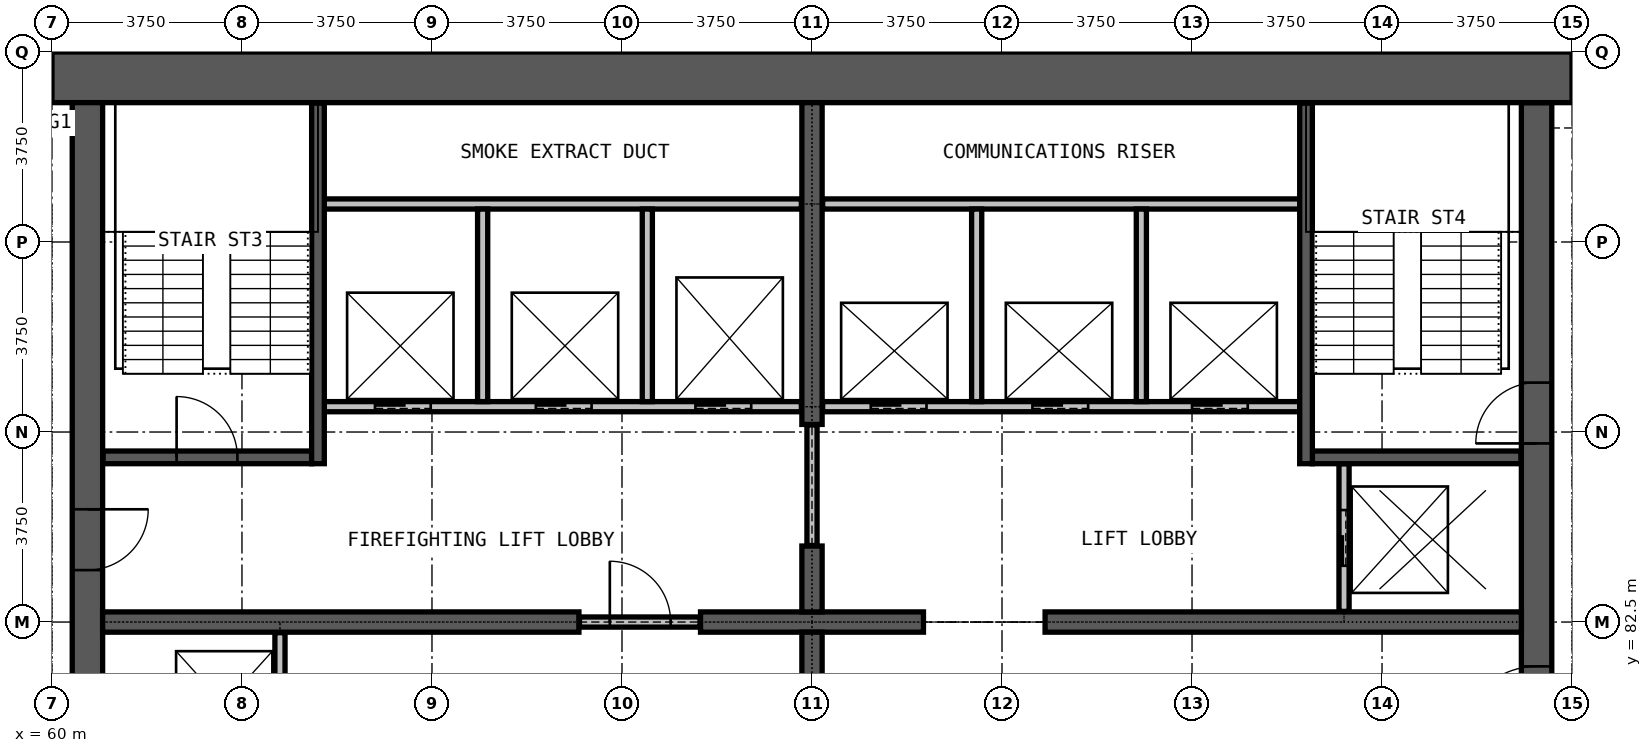
"""IFC4 building model, lengths in metres.
Left out: names, types, materials, properties, quantities, classifications, styles, units other than length and angle.
Written with IfcOpenShell. Run it as: python <this file> out.ifc"""

import sys

from ifc_helpers import new_model, si_unit, direction, frame, frame_2d, origin, place, context, subcontext, project, spatial, rectangle, extrude, element, fill, save


model = new_model("IFC4")
c1 = context("Model", 3, precision=1e-05, world=origin(), true_north=direction((0.0, 1.0)))
c2 = subcontext(c1, "Body", "Model", "MODEL_VIEW")
j1 = project(units=[si_unit("LENGTHUNIT", "METRE"), si_unit("PLANEANGLEUNIT", "RADIAN")], contexts=[c1])
p1 = place(None, origin())
s1 = spatial("IfcSite", under=j1, at=p1, CompositionType="ELEMENT")
p2 = place(p1, origin())
s2 = spatial("IfcBuilding", under=s1, at=p2, CompositionType="ELEMENT")
p3 = place(p2, frame((0.0, 0.0, 231.9)))
s3 = spatial("IfcBuildingStorey", under=s2, at=p3, CompositionType="ELEMENT", Elevation=231.9)
p4 = place(p3, frame((89.3, 72.25, 0.0), z_axis=(0.0, 0.0, 1.0), x_axis=(0.0, 1.0, 0.0)))
e1 = element("IfcWall", 1, at=p4, inside=s3, PredefinedType="SHEAR", context=c2, shape_type="SweptSolid", body=[
    extrude(rectangle(XDim=20.5, YDim=0.6, at=frame_2d((10.25, 0.0))), origin(), (0.0, 0.0, 1.0), 3.6),
])
p5 = place(p4, frame((0.275, 0.0, 0.0)))
e2 = element("IfcOpeningElement", 2, at=p5, cuts=e1, PredefinedType="OPENING", context=c2, shape_type="SweptSolid", body=[
    extrude(rectangle(XDim=1.2, YDim=2.2, at=frame_2d((0.6, 1.1))), frame((0.0, 0.31, 0.0), z_axis=(0.0, -1.0, 0.0), x_axis=(1.0, 0.0, 0.0)), (0.0, 0.0, 1.0), 0.62),
])
p6 = place(p4, frame((13.775, 0.0, 0.0)))
e3 = element("IfcOpeningElement", 3, at=p6, cuts=e1, PredefinedType="OPENING", context=c2, shape_type="SweptSolid", body=[
    extrude(rectangle(XDim=1.2, YDim=2.2, at=frame_2d((0.6, 1.1))), frame((0.0, 0.31, 0.0), z_axis=(0.0, -1.0, 0.0), x_axis=(1.0, 0.0, 0.0)), (0.0, 0.0, 1.0), 0.62),
])
p7 = place(p4, frame((7.875, 0.0, 0.0)))
e4 = element("IfcOpeningElement", 4, at=p7, cuts=e1, PredefinedType="OPENING", context=c2, shape_type="SweptSolid", body=[
    extrude(rectangle(XDim=1.5, YDim=2.2, at=frame_2d((0.75, 1.1))), frame((0.0, 0.31, 0.0), z_axis=(0.0, -1.0, 0.0), x_axis=(1.0, 0.0, 0.0)), (0.0, 0.0, 1.0), 0.62),
])
p8 = place(p3, frame((90.0, 93.25, 0.0), z_axis=(0.0, 0.0, 1.0), x_axis=(-1.0, 0.0, 0.0)))
e5 = element("IfcWall", 5, at=p8, inside=s3, PredefinedType="SHEAR", context=c2, shape_type="SweptSolid", body=[
    extrude(rectangle(XDim=30.0, YDim=1.0, at=frame_2d((15.0, 0.0))), origin(), (0.0, 0.0, 1.0), 3.6),
])
p9 = place(p3, frame((60.7, 92.75, 0.0), z_axis=(0.0, 0.0, 1.0), x_axis=(0.0, -1.0, 0.0)))
e6 = element("IfcWall", 6, at=p9, inside=s3, PredefinedType="SHEAR", context=c2, shape_type="SweptSolid", body=[
    extrude(rectangle(XDim=20.5, YDim=0.6, at=frame_2d((10.25, 0.0))), origin(), (0.0, 0.0, 1.0), 3.6),
])
p10 = place(p9, frame((19.025, 0.0, 0.0)))
e7 = element("IfcOpeningElement", 7, at=p10, cuts=e6, PredefinedType="OPENING", context=c2, shape_type="SweptSolid", body=[
    extrude(rectangle(XDim=1.2, YDim=2.2, at=frame_2d((0.6, 1.1))), frame((0.0, 0.31, 0.0), z_axis=(0.0, -1.0, 0.0), x_axis=(1.0, 0.0, 0.0)), (0.0, 0.0, 1.0), 0.62),
])
p11 = place(p9, frame((8.025, 0.0, 0.0)))
e8 = element("IfcOpeningElement", 8, at=p11, cuts=e6, PredefinedType="OPENING", context=c2, shape_type="SweptSolid", body=[
    extrude(rectangle(XDim=1.2, YDim=2.2, at=frame_2d((0.6, 1.1))), frame((0.0, 0.31, 0.0), z_axis=(0.0, -1.0, 0.0), x_axis=(1.0, 0.0, 0.0)), (0.0, 0.0, 1.0), 0.62),
])
p12 = place(p3, frame((61.0, 82.5, 0.0), z_axis=(0.0, 0.0, 1.0), x_axis=(1.0, 0.0, 0.0)))
e9 = element("IfcWall", 9, at=p12, inside=s3, PredefinedType="SHEAR", context=c2, shape_type="SweptSolid", body=[
    extrude(rectangle(XDim=9.4, YDim=0.4, at=frame_2d((4.7, 0.0))), origin(), (0.0, 0.0, 1.0), 3.6),
])
p13 = place(p3, frame((72.8, 82.5, 0.0), z_axis=(0.0, 0.0, 1.0), x_axis=(1.0, 0.0, 0.0)))
e10 = element("IfcWall", 10, at=p13, inside=s3, PredefinedType="SHEAR", context=c2, shape_type="SweptSolid", body=[
    extrude(rectangle(XDim=4.4, YDim=0.4, at=frame_2d((2.2, 0.0))), origin(), (0.0, 0.0, 1.0), 3.6),
])
p14 = place(p3, frame((79.6, 82.5, 0.0), z_axis=(0.0, 0.0, 1.0), x_axis=(1.0, 0.0, 0.0)))
e11 = element("IfcWall", 11, at=p14, inside=s3, PredefinedType="SHEAR", context=c2, shape_type="SweptSolid", body=[
    extrude(rectangle(XDim=9.4, YDim=0.4, at=frame_2d((4.7, 0.0))), origin(), (0.0, 0.0, 1.0), 3.6),
])
for number, where, z_axis, x_axis in (
    (12, (75.0, 81.0, 0.0), (0.0, 0.0, 1.0), (0.0, 1.0, 0.0)),
    (13, (75.0, 82.7, 0.0), (0.0, 0.0, 1.0), (0.0, 1.0, 0.0)),
):
    element("IfcWall", number, at=place(p3, frame(where, z_axis=z_axis, x_axis=x_axis)), inside=s3, PredefinedType="SHEAR", context=c2, shape_type="SweptSolid", body=[
        extrude(rectangle(XDim=1.3, YDim=0.4, at=frame_2d((0.65, 0.0))), origin(), (0.0, 0.0, 1.0), 3.6),
    ])
p15 = place(p3, frame((75.0, 86.4, 0.0), z_axis=(0.0, 0.0, 1.0), x_axis=(0.0, 1.0, 0.0)))
e14 = element("IfcWall", 14, at=p15, inside=s3, PredefinedType="SHEAR", context=c2, shape_type="SweptSolid", body=[
    extrude(rectangle(XDim=6.35, YDim=0.4, at=frame_2d((3.175, 0.0))), origin(), (0.0, 0.0, 1.0), 3.6),
])
p16 = place(p3, frame((70.41, 82.5, 0.0), z_axis=(0.0, 0.0, 1.0), x_axis=(1.0, 0.0, 0.0)))
e15 = element("IfcWall", 15, at=p16, inside=s3, PredefinedType="PARTITIONING", context=c2, shape_type="SweptSolid", body=[
    extrude(rectangle(XDim=2.38, YDim=0.2, at=frame_2d((1.19, 0.0))), origin(), (0.0, 0.0, 1.0), 2.4),
])
p17 = place(p16, frame((0.6, 0.0, 0.0)))
e16 = element("IfcOpeningElement", 16, at=p17, cuts=e15, PredefinedType="OPENING", context=c2, shape_type="SweptSolid", body=[
    extrude(rectangle(XDim=1.2, YDim=2.2, at=frame_2d((0.6, 1.1))), frame((0.0, 0.11, 0.0), z_axis=(0.0, -1.0, 0.0), x_axis=(1.0, 0.0, 0.0)), (0.0, 0.0, 1.0), 0.22),
])
p18 = place(p3, frame((75.0, 84.01, 0.0), z_axis=(0.0, 0.0, 1.0), x_axis=(0.0, 1.0, 0.0)))
e17 = element("IfcWall", 17, at=p18, inside=s3, PredefinedType="PARTITIONING", context=c2, shape_type="SweptSolid", body=[
    extrude(rectangle(XDim=2.38, YDim=0.2, at=frame_2d((1.19, 0.0))), origin(), (0.0, 0.0, 1.0), 2.4),
])
p19 = place(p3, frame((65.375, 86.75, 0.0), z_axis=(0.0, 0.0, 1.0), x_axis=(1.0, 0.0, 0.0)))
e18 = element("IfcWall", 18, at=p19, inside=s3, PredefinedType="PARTITIONING", context=c2, shape_type="SweptSolid", body=[
    extrude(rectangle(XDim=9.415, YDim=0.2, at=frame_2d((4.708, 0.0))), origin(), (0.0, 0.0, 1.0), 3.3),
])
p20 = place(p19, frame((1.0, 0.0, 0.0)))
e19 = element("IfcOpeningElement", 19, at=p20, cuts=e18, PredefinedType="OPENING", context=c2, shape_type="SweptSolid", body=[
    extrude(rectangle(XDim=1.1, YDim=2.2, at=frame_2d((0.55, 1.1))), frame((0.0, 0.11, 0.0), z_axis=(0.0, -1.0, 0.0), x_axis=(1.0, 0.0, 0.0)), (0.0, 0.0, 1.0), 0.22),
])
p21 = place(p19, frame((4.175, 0.0, 0.0)))
e20 = element("IfcOpeningElement", 20, at=p21, cuts=e18, PredefinedType="OPENING", context=c2, shape_type="SweptSolid", body=[
    extrude(rectangle(XDim=1.1, YDim=2.2, at=frame_2d((0.55, 1.1))), frame((0.0, 0.11, 0.0), z_axis=(0.0, -1.0, 0.0), x_axis=(1.0, 0.0, 0.0)), (0.0, 0.0, 1.0), 0.22),
])
p22 = place(p19, frame((7.325, 0.0, 0.0)))
e21 = element("IfcOpeningElement", 21, at=p22, cuts=e18, PredefinedType="OPENING", context=c2, shape_type="SweptSolid", body=[
    extrude(rectangle(XDim=1.1, YDim=2.2, at=frame_2d((0.55, 1.1))), frame((0.0, 0.11, 0.0), z_axis=(0.0, -1.0, 0.0), x_axis=(1.0, 0.0, 0.0)), (0.0, 0.0, 1.0), 0.22),
])
p23 = place(p3, frame((75.21, 86.75, 0.0), z_axis=(0.0, 0.0, 1.0), x_axis=(1.0, 0.0, 0.0)))
e22 = element("IfcWall", 22, at=p23, inside=s3, PredefinedType="PARTITIONING", context=c2, shape_type="SweptSolid", body=[
    extrude(rectangle(XDim=9.415, YDim=0.2, at=frame_2d((4.708, 0.0))), origin(), (0.0, 0.0, 1.0), 3.3),
])
p24 = place(p23, frame((0.95, 0.0, 0.0)))
e23 = element("IfcOpeningElement", 23, at=p24, cuts=e22, PredefinedType="OPENING", context=c2, shape_type="SweptSolid", body=[
    extrude(rectangle(XDim=1.1, YDim=2.2, at=frame_2d((0.55, 1.1))), frame((0.0, 0.11, 0.0), z_axis=(0.0, -1.0, 0.0), x_axis=(1.0, 0.0, 0.0)), (0.0, 0.0, 1.0), 0.22),
])
p25 = place(p23, frame((4.14, 0.0, 0.0)))
e24 = element("IfcOpeningElement", 24, at=p25, cuts=e22, PredefinedType="OPENING", context=c2, shape_type="SweptSolid", body=[
    extrude(rectangle(XDim=1.1, YDim=2.2, at=frame_2d((0.55, 1.1))), frame((0.0, 0.11, 0.0), z_axis=(0.0, -1.0, 0.0), x_axis=(1.0, 0.0, 0.0)), (0.0, 0.0, 1.0), 0.22),
])
p26 = place(p23, frame((7.29, 0.0, 0.0)))
e25 = element("IfcOpeningElement", 25, at=p26, cuts=e22, PredefinedType="OPENING", context=c2, shape_type="SweptSolid", body=[
    extrude(rectangle(XDim=1.1, YDim=2.2, at=frame_2d((0.55, 1.1))), frame((0.0, 0.11, 0.0), z_axis=(0.0, -1.0, 0.0), x_axis=(1.0, 0.0, 0.0)), (0.0, 0.0, 1.0), 0.22),
])
for number, where, z_axis, x_axis in (
    (26, (65.375, 90.75, 0.0), (0.0, 0.0, 1.0), (1.0, 0.0, 0.0)),
    (27, (75.21, 90.75, 0.0), (0.0, 0.0, 1.0), (1.0, 0.0, 0.0)),
):
    element("IfcWall", number, at=place(p3, frame(where, z_axis=z_axis, x_axis=x_axis)), inside=s3, PredefinedType="PARTITIONING", context=c2, shape_type="SweptSolid", body=[
        extrude(rectangle(XDim=9.415, YDim=0.2, at=frame_2d((4.708, 0.0))), origin(), (0.0, 0.0, 1.0), 3.3),
    ])
p27 = place(p3, frame((64.5, 79.375, 0.0), z_axis=(0.0, 0.0, 1.0), x_axis=(0.0, 1.0, 0.0)))
e28 = element("IfcWall", 28, at=p27, inside=s3, PredefinedType="PARTITIONING", context=c2, shape_type="SweptSolid", body=[
    extrude(rectangle(XDim=2.915, YDim=0.2, at=frame_2d((1.458, 0.0))), origin(), (0.0, 0.0, 1.0), 3.3),
])
for number, where, z_axis, x_axis in (
    (29, (68.5, 86.85, 0.0), (0.0, 0.0, 1.0), (0.0, 1.0, 0.0)),
    (30, (71.75, 86.85, 0.0), (0.0, 0.0, 1.0), (0.0, 1.0, 0.0)),
    (31, (78.25, 86.85, 0.0), (0.0, 0.0, 1.0), (0.0, 1.0, 0.0)),
    (32, (81.5, 86.85, 0.0), (0.0, 0.0, 1.0), (0.0, 1.0, 0.0)),
):
    element("IfcWall", number, at=place(p3, frame(where, z_axis=z_axis, x_axis=x_axis)), inside=s3, PredefinedType="PARTITIONING", context=c2, shape_type="SweptSolid", body=[
        extrude(rectangle(XDim=3.8, YDim=0.2, at=frame_2d((1.9, 0.0))), origin(), (0.0, 0.0, 1.0), 3.3),
    ])
p28 = place(p3, frame((85.5, 82.71, 0.0), z_axis=(0.0, 0.0, 1.0), x_axis=(0.0, 1.0, 0.0)))
e33 = element("IfcWall", 33, at=p28, inside=s3, PredefinedType="PARTITIONING", context=c2, shape_type="SweptSolid", body=[
    extrude(rectangle(XDim=2.915, YDim=0.2, at=frame_2d((1.458, 0.0))), origin(), (0.0, 0.0, 1.0), 3.3),
])
p29 = place(p28, frame((0.9, 0.0, 0.0)))
e34 = element("IfcOpeningElement", 34, at=p29, cuts=e33, PredefinedType="OPENING", context=c2, shape_type="SweptSolid", body=[
    extrude(rectangle(XDim=1.1, YDim=2.2, at=frame_2d((0.55, 1.1))), frame((0.0, 0.11, 0.0), z_axis=(0.0, -1.0, 0.0), x_axis=(1.0, 0.0, 0.0)), (0.0, 0.0, 1.0), 0.22),
])
p30 = place(p3, frame((61.01, 85.75, 0.0), z_axis=(0.0, 0.0, 1.0), x_axis=(1.0, 0.0, 0.0)))
e35 = element("IfcWall", 35, at=p30, inside=s3, PredefinedType="PARTITIONING", context=c2, shape_type="SweptSolid", body=[
    extrude(rectangle(XDim=4.115, YDim=0.25, at=frame_2d((2.058, 0.0))), origin(), (0.0, 0.0, 1.0), 3.3),
])
p31 = place(p30, frame((1.45, 0.0, 0.0)))
e36 = element("IfcOpeningElement", 36, at=p31, cuts=e35, PredefinedType="OPENING", context=c2, shape_type="SweptSolid", body=[
    extrude(rectangle(XDim=1.2, YDim=2.2, at=frame_2d((0.6, 1.1))), frame((0.0, 0.135, 0.0), z_axis=(0.0, -1.0, 0.0), x_axis=(1.0, 0.0, 0.0)), (0.0, 0.0, 1.0), 0.27),
])
p32 = place(p3, frame((84.875, 85.75, 0.0), z_axis=(0.0, 0.0, 1.0), x_axis=(1.0, 0.0, 0.0)))
e37 = element("IfcWall", 37, at=p32, inside=s3, PredefinedType="PARTITIONING", context=c2, shape_type="SweptSolid", body=[
    extrude(rectangle(XDim=4.115, YDim=0.25, at=frame_2d((2.058, 0.0))), origin(), (0.0, 0.0, 1.0), 3.3),
])
for number, where, z_axis, x_axis in (
    (38, (65.25, 85.625, 0.0), (0.0, 0.0, 1.0), (0.0, 1.0, 0.0)),
    (39, (84.75, 85.625, 0.0), (0.0, 0.0, 1.0), (0.0, 1.0, 0.0)),
):
    element("IfcWall", number, at=place(p3, frame(where, z_axis=z_axis, x_axis=x_axis)), inside=s3, PredefinedType="PARTITIONING", context=c2, shape_type="SweptSolid", body=[
        extrude(rectangle(XDim=7.115, YDim=0.25, at=frame_2d((3.558, 0.0))), origin(), (0.0, 0.0, 1.0), 3.3),
    ])
p33 = place(p24, origin())
e40 = element("IfcDoor", 40, at=p33, inside=s3, OperationType="DOUBLE_DOOR_SLIDING", PredefinedType="DOOR", context=c2, shape_type="SweptSolid", body=[
    extrude(rectangle(XDim=1.1, YDim=2.2, at=frame_2d((0.55, 1.1))), frame((0.0, 0.025, 0.0), z_axis=(0.0, -1.0, 0.0), x_axis=(1.0, 0.0, 0.0)), (0.0, 0.0, 1.0), 0.05),
])
fill(e23, e40)
p34 = place(p25, origin())
e41 = element("IfcDoor", 41, at=p34, inside=s3, OperationType="DOUBLE_DOOR_SLIDING", PredefinedType="DOOR", context=c2, shape_type="SweptSolid", body=[
    extrude(rectangle(XDim=1.1, YDim=2.2, at=frame_2d((0.55, 1.1))), frame((0.0, 0.025, 0.0), z_axis=(0.0, -1.0, 0.0), x_axis=(1.0, 0.0, 0.0)), (0.0, 0.0, 1.0), 0.05),
])
fill(e24, e41)
p35 = place(p26, origin())
e42 = element("IfcDoor", 42, at=p35, inside=s3, OperationType="DOUBLE_DOOR_SLIDING", PredefinedType="DOOR", context=c2, shape_type="SweptSolid", body=[
    extrude(rectangle(XDim=1.1, YDim=2.2, at=frame_2d((0.55, 1.1))), frame((0.0, 0.025, 0.0), z_axis=(0.0, -1.0, 0.0), x_axis=(1.0, 0.0, 0.0)), (0.0, 0.0, 1.0), 0.05),
])
fill(e25, e42)
p36 = place(p20, origin())
e43 = element("IfcDoor", 43, at=p36, inside=s3, OperationType="DOUBLE_DOOR_SLIDING", PredefinedType="DOOR", context=c2, shape_type="SweptSolid", body=[
    extrude(rectangle(XDim=1.1, YDim=2.2, at=frame_2d((0.55, 1.1))), frame((0.0, 0.025, 0.0), z_axis=(0.0, -1.0, 0.0), x_axis=(1.0, 0.0, 0.0)), (0.0, 0.0, 1.0), 0.05),
])
fill(e19, e43)
p37 = place(p21, origin())
e44 = element("IfcDoor", 44, at=p37, inside=s3, OperationType="DOUBLE_DOOR_SLIDING", PredefinedType="DOOR", context=c2, shape_type="SweptSolid", body=[
    extrude(rectangle(XDim=1.1, YDim=2.2, at=frame_2d((0.55, 1.1))), frame((0.0, 0.025, 0.0), z_axis=(0.0, -1.0, 0.0), x_axis=(1.0, 0.0, 0.0)), (0.0, 0.0, 1.0), 0.05),
])
fill(e20, e44)
p38 = place(p22, origin())
e45 = element("IfcDoor", 45, at=p38, inside=s3, OperationType="DOUBLE_DOOR_SLIDING", PredefinedType="DOOR", context=c2, shape_type="SweptSolid", body=[
    extrude(rectangle(XDim=1.1, YDim=2.2, at=frame_2d((0.55, 1.1))), frame((0.0, 0.025, 0.0), z_axis=(0.0, -1.0, 0.0), x_axis=(1.0, 0.0, 0.0)), (0.0, 0.0, 1.0), 0.05),
])
fill(e21, e45)
p39 = place(p29, origin())
e46 = element("IfcDoor", 46, at=p39, inside=s3, OperationType="DOUBLE_DOOR_SLIDING", PredefinedType="DOOR", context=c2, shape_type="SweptSolid", body=[
    extrude(rectangle(XDim=1.1, YDim=2.2, at=frame_2d((0.55, 1.1))), frame((0.0, 0.025, 0.0), z_axis=(0.0, -1.0, 0.0), x_axis=(1.0, 0.0, 0.0)), (0.0, 0.0, 1.0), 0.05),
])
fill(e34, e46)
p40 = place(p17, origin())
e47 = element("IfcDoor", 47, at=p40, inside=s3, OperationType="SINGLE_SWING_RIGHT", PredefinedType="DOOR", context=c2, shape_type="SweptSolid", body=[
    extrude(rectangle(XDim=1.2, YDim=2.2, at=frame_2d((0.6, 1.1))), frame((0.0, 0.025, 0.0), z_axis=(0.0, -1.0, 0.0), x_axis=(1.0, 0.0, 0.0)), (0.0, 0.0, 1.0), 0.05),
])
fill(e16, e47)
p41 = place(p31, origin())
e48 = element("IfcDoor", 48, at=p41, inside=s3, OperationType="SINGLE_SWING_LEFT", PredefinedType="DOOR", context=c2, shape_type="SweptSolid", body=[
    extrude(rectangle(XDim=1.2, YDim=2.2, at=frame_2d((0.6, 1.1))), frame((0.0, 0.025, 0.0), z_axis=(0.0, -1.0, 0.0), x_axis=(1.0, 0.0, 0.0)), (0.0, 0.0, 1.0), 0.05),
])
fill(e36, e48)
p42 = place(p6, origin())
e49 = element("IfcDoor", 49, at=p42, inside=s3, OperationType="SINGLE_SWING_LEFT", PredefinedType="DOOR", context=c2, shape_type="SweptSolid", body=[
    extrude(rectangle(XDim=1.2, YDim=2.2, at=frame_2d((0.6, 1.1))), frame((0.0, 0.025, 0.0), z_axis=(0.0, -1.0, 0.0), x_axis=(1.0, 0.0, 0.0)), (0.0, 0.0, 1.0), 0.05),
])
fill(e3, e49)
p43 = place(p7, origin())
e50 = element("IfcDoor", 50, at=p43, inside=s3, OperationType="DOUBLE_DOOR_SINGLE_SWING", PredefinedType="DOOR", context=c2, shape_type="SweptSolid", body=[
    extrude(rectangle(XDim=1.5, YDim=2.2, at=frame_2d((0.75, 1.1))), frame((0.0, 0.025, 0.0), z_axis=(0.0, -1.0, 0.0), x_axis=(1.0, 0.0, 0.0)), (0.0, 0.0, 1.0), 0.05),
])
fill(e4, e50)
p44 = place(p11, origin())
e51 = element("IfcDoor", 51, at=p44, inside=s3, OperationType="SINGLE_SWING_LEFT", PredefinedType="DOOR", context=c2, shape_type="SweptSolid", body=[
    extrude(rectangle(XDim=1.2, YDim=2.2, at=frame_2d((0.6, 1.1))), frame((0.0, 0.025, 0.0), z_axis=(0.0, -1.0, 0.0), x_axis=(1.0, 0.0, 0.0)), (0.0, 0.0, 1.0), 0.05),
])
fill(e8, e51)
save(model, sys.argv[1])
